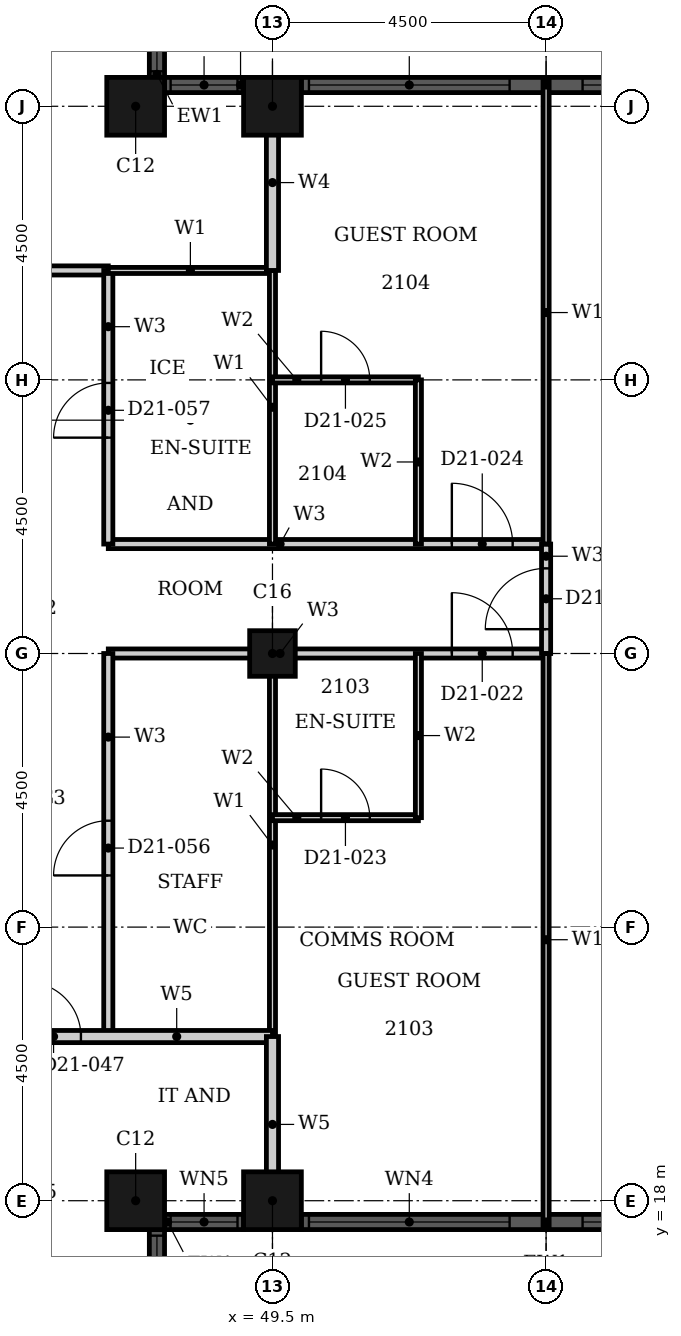
"""IFC4 building model, lengths in metres.
Left out: names, types, materials, properties, quantities, classifications, styles, units other than length and angle.
Written with IfcOpenShell. Run it as: python <this file> out.ifc"""

import sys

from ifc_helpers import new_model, si_unit, direction, frame, frame_2d, origin, origin_2d, place, context, subcontext, project, spatial, rectangle, hollow_rectangle, extrude, element, fill, save


model = new_model("IFC4")
c1 = context("Model", 3, precision=1e-05, world=origin(), true_north=direction((0.0, 1.0)))
c2 = subcontext(c1, "Body", "Model", "MODEL_VIEW")
j1 = project(units=[si_unit("LENGTHUNIT", "METRE"), si_unit("PLANEANGLEUNIT", "RADIAN")], contexts=[c1])
p1 = place(None, origin())
s1 = spatial("IfcSite", under=j1, at=p1, CompositionType="ELEMENT")
p2 = place(p1, origin())
s2 = spatial("IfcBuilding", under=s1, at=p2, CompositionType="ELEMENT")
p3 = place(p2, frame((0.0, 0.0, 88.8)))
s3 = spatial("IfcBuildingStorey", under=s2, at=p3, CompositionType="ELEMENT", Elevation=88.8)
for number, where, z_axis, x_axis in (
    (1, (47.25, 18.0, 0.0), (0.0, 0.0, 1.0), (1.0, 0.0, 0.0)),
    (2, (49.5, 18.0, 0.0), (0.0, 0.0, 1.0), (1.0, 0.0, 0.0)),
    (3, (49.5, 36.0, 0.0), (0.0, 0.0, 1.0), (1.0, 0.0, 0.0)),
    (4, (47.25, 36.0, 0.0), (0.0, 0.0, 1.0), (1.0, 0.0, 0.0)),
):
    element("IfcColumn", number, at=place(p3, frame(where, z_axis=z_axis, x_axis=x_axis)), inside=s3, PredefinedType="COLUMN", context=c2, shape_type="SweptSolid", body=[
        extrude(hollow_rectangle(XDim=0.95, YDim=0.95, WallThickness=0.03, at=origin_2d()), origin(), (0.0, 0.0, 1.0), 3.6),
    ])
p4 = place(p3, frame((49.5, 27.0, 0.0), z_axis=(0.0, 0.0, 1.0), x_axis=(1.0, 0.0, 0.0)))
e5 = element("IfcColumn", 5, at=p4, inside=s3, PredefinedType="COLUMN", context=c2, shape_type="SweptSolid", body=[
    extrude(hollow_rectangle(XDim=0.75, YDim=0.75, WallThickness=0.024, at=origin_2d()), origin(), (0.0, 0.0, 1.0), 3.6),
])
p5 = place(p3, frame((47.6, 16.225, 0.0), z_axis=(0.0, 0.0, 1.0), x_axis=(0.0, 1.0, 0.0)))
e6 = element("IfcWall", 6, at=p5, inside=s3, PredefinedType="SOLIDWALL", context=c2, shape_type="SweptSolid", body=[
    extrude(rectangle(XDim=1.3, YDim=0.25, at=frame_2d((0.65, 0.0))), origin(), (0.0, 0.0, 1.0), 3.6),
])
p6 = place(p5, frame((0.1, 0.0, 0.9)))
e7 = element("IfcOpeningElement", 7, at=p6, cuts=e6, PredefinedType="OPENING", context=c2, shape_type="SweptSolid", body=[
    extrude(rectangle(XDim=1.1, YDim=2.08, at=frame_2d((0.55, 1.04))), frame((0.0, 0.135, 0.0), z_axis=(0.0, -1.0, 0.0), x_axis=(1.0, 0.0, 0.0)), (0.0, 0.0, 1.0), 0.27),
])
p7 = place(p3, frame((47.725, 17.65, 0.0), z_axis=(0.0, 0.0, 1.0), x_axis=(1.0, 0.0, 0.0)))
e8 = element("IfcWall", 8, at=p7, inside=s3, PredefinedType="SOLIDWALL", context=c2, shape_type="SweptSolid", body=[
    extrude(rectangle(XDim=1.3, YDim=0.25, at=frame_2d((0.65, 0.0))), origin(), (0.0, 0.0, 1.0), 3.6),
])
p8 = place(p7, frame((0.1, 0.0, 0.9)))
e9 = element("IfcOpeningElement", 9, at=p8, cuts=e8, PredefinedType="OPENING", context=c2, shape_type="SweptSolid", body=[
    extrude(rectangle(XDim=1.1, YDim=2.08, at=frame_2d((0.55, 1.04))), frame((0.0, 0.135, 0.0), z_axis=(0.0, -1.0, 0.0), x_axis=(1.0, 0.0, 0.0)), (0.0, 0.0, 1.0), 0.27),
])
p9 = place(p3, frame((49.975, 17.65, 0.0), z_axis=(0.0, 0.0, 1.0), x_axis=(1.0, 0.0, 0.0)))
e10 = element("IfcWall", 10, at=p9, inside=s3, PredefinedType="SOLIDWALL", context=c2, shape_type="SweptSolid", body=[
    extrude(rectangle(XDim=8.05, YDim=0.25, at=frame_2d((4.025, 0.0))), origin(), (0.0, 0.0, 1.0), 3.6),
])
p10 = place(p9, frame((0.125, 0.0, 0.9)))
e11 = element("IfcOpeningElement", 11, at=p10, cuts=e10, PredefinedType="OPENING", context=c2, shape_type="SweptSolid", body=[
    extrude(rectangle(XDim=3.3, YDim=2.08, at=frame_2d((1.65, 1.04))), frame((0.0, 0.135, 0.0), z_axis=(0.0, -1.0, 0.0), x_axis=(1.0, 0.0, 0.0)), (0.0, 0.0, 1.0), 0.27),
])
p11 = place(p9, frame((4.625, 0.0, 0.9)))
e12 = element("IfcOpeningElement", 12, at=p11, cuts=e10, PredefinedType="OPENING", context=c2, shape_type="SweptSolid", body=[
    extrude(rectangle(XDim=3.3, YDim=2.08, at=frame_2d((1.65, 1.04))), frame((0.0, 0.135, 0.0), z_axis=(0.0, -1.0, 0.0), x_axis=(1.0, 0.0, 0.0)), (0.0, 0.0, 1.0), 0.27),
])
p12 = place(p3, frame((58.025, 36.35, 0.0), z_axis=(0.0, 0.0, 1.0), x_axis=(-1.0, 0.0, 0.0)))
e13 = element("IfcWall", 13, at=p12, inside=s3, PredefinedType="SOLIDWALL", context=c2, shape_type="SweptSolid", body=[
    extrude(rectangle(XDim=8.05, YDim=0.25, at=frame_2d((4.025, 0.0))), origin(), (0.0, 0.0, 1.0), 3.6),
])
p13 = place(p12, frame((0.125, 0.0, 0.9)))
e14 = element("IfcOpeningElement", 14, at=p13, cuts=e13, PredefinedType="OPENING", context=c2, shape_type="SweptSolid", body=[
    extrude(rectangle(XDim=3.3, YDim=2.08, at=frame_2d((1.65, 1.04))), frame((0.0, 0.135, 0.0), z_axis=(0.0, -1.0, 0.0), x_axis=(1.0, 0.0, 0.0)), (0.0, 0.0, 1.0), 0.27),
])
p14 = place(p12, frame((4.625, 0.0, 0.9)))
e15 = element("IfcOpeningElement", 15, at=p14, cuts=e13, PredefinedType="OPENING", context=c2, shape_type="SweptSolid", body=[
    extrude(rectangle(XDim=3.3, YDim=2.08, at=frame_2d((1.65, 1.04))), frame((0.0, 0.135, 0.0), z_axis=(0.0, -1.0, 0.0), x_axis=(1.0, 0.0, 0.0)), (0.0, 0.0, 1.0), 0.27),
])
p15 = place(p3, frame((49.025, 36.35, 0.0), z_axis=(0.0, 0.0, 1.0), x_axis=(-1.0, 0.0, 0.0)))
e16 = element("IfcWall", 16, at=p15, inside=s3, PredefinedType="SOLIDWALL", context=c2, shape_type="SweptSolid", body=[
    extrude(rectangle(XDim=1.3, YDim=0.25, at=frame_2d((0.65, 0.0))), origin(), (0.0, 0.0, 1.0), 3.6),
])
p16 = place(p15, frame((0.1, 0.0, 0.9)))
e17 = element("IfcOpeningElement", 17, at=p16, cuts=e16, PredefinedType="OPENING", context=c2, shape_type="SweptSolid", body=[
    extrude(rectangle(XDim=1.1, YDim=2.08, at=frame_2d((0.55, 1.04))), frame((0.0, 0.135, 0.0), z_axis=(0.0, -1.0, 0.0), x_axis=(1.0, 0.0, 0.0)), (0.0, 0.0, 1.0), 0.27),
])
p17 = place(p3, frame((47.6, 36.475, 0.0), z_axis=(0.0, 0.0, 1.0), x_axis=(0.0, 1.0, 0.0)))
e18 = element("IfcWall", 18, at=p17, inside=s3, PredefinedType="SOLIDWALL", context=c2, shape_type="SweptSolid", body=[
    extrude(rectangle(XDim=1.3, YDim=0.25, at=frame_2d((0.65, 0.0))), origin(), (0.0, 0.0, 1.0), 3.6),
])
p18 = place(p17, frame((0.1, 0.0, 0.9)))
e19 = element("IfcOpeningElement", 19, at=p18, cuts=e18, PredefinedType="OPENING", context=c2, shape_type="SweptSolid", body=[
    extrude(rectangle(XDim=1.1, YDim=2.08, at=frame_2d((0.55, 1.04))), frame((0.0, 0.135, 0.0), z_axis=(0.0, -1.0, 0.0), x_axis=(1.0, 0.0, 0.0)), (0.0, 0.0, 1.0), 0.27),
])
p19 = place(p3, frame((46.8, 27.0, 0.0), z_axis=(0.0, 0.0, 1.0), x_axis=(1.0, 0.0, 0.0)))
e20 = element("IfcWall", 20, at=p19, inside=s3, PredefinedType="PARTITIONING", context=c2, shape_type="SweptSolid", body=[
    extrude(rectangle(XDim=7.2, YDim=0.15, at=frame_2d((3.6, 0.0))), origin(), (0.0, 0.0, 1.0), 2.58),
])
p20 = place(p19, frame((5.65, 0.0, 0.0)))
e21 = element("IfcOpeningElement", 21, at=p20, cuts=e20, PredefinedType="OPENING", context=c2, shape_type="SweptSolid", body=[
    extrude(rectangle(XDim=1.0, YDim=2.1, at=frame_2d((0.5, 1.05))), frame((0.0, 0.085, 0.0), z_axis=(0.0, -1.0, 0.0), x_axis=(1.0, 0.0, 0.0)), (0.0, 0.0, 1.0), 0.17),
])
p21 = place(p3, frame((46.8, 28.8, 0.0), z_axis=(0.0, 0.0, 1.0), x_axis=(1.0, 0.0, 0.0)))
e22 = element("IfcWall", 22, at=p21, inside=s3, PredefinedType="PARTITIONING", context=c2, shape_type="SweptSolid", body=[
    extrude(rectangle(XDim=7.2, YDim=0.15, at=frame_2d((3.6, 0.0))), origin(), (0.0, 0.0, 1.0), 3.3),
])
p22 = place(p21, frame((5.65, 0.0, 0.0)))
e23 = element("IfcOpeningElement", 23, at=p22, cuts=e22, PredefinedType="OPENING", context=c2, shape_type="SweptSolid", body=[
    extrude(rectangle(XDim=1.0, YDim=2.1, at=frame_2d((0.5, 1.05))), frame((0.0, 0.085, 0.0), z_axis=(0.0, -1.0, 0.0), x_axis=(1.0, 0.0, 0.0)), (0.0, 0.0, 1.0), 0.17),
])
p23 = place(p3, frame((33.3, 33.3, 0.0), z_axis=(0.0, 0.0, 1.0), x_axis=(1.0, 0.0, 0.0)))
e24 = element("IfcWall", 24, at=p23, inside=s3, PredefinedType="PARTITIONING", context=c2, shape_type="SweptSolid", body=[
    extrude(rectangle(XDim=13.5, YDim=0.15, at=frame_2d((6.75, 0.0))), origin(), (0.0, 0.0, 1.0), 3.3),
])
p24 = place(p23, frame((10.15, 0.0, 0.0)))
e25 = element("IfcOpeningElement", 25, at=p24, cuts=e24, PredefinedType="OPENING", context=c2, shape_type="SweptSolid", body=[
    extrude(rectangle(XDim=1.0, YDim=2.1, at=frame_2d((0.5, 1.05))), frame((0.0, 0.085, 0.0), z_axis=(0.0, -1.0, 0.0), x_axis=(1.0, 0.0, 0.0)), (0.0, 0.0, 1.0), 0.17),
])
p25 = place(p23, frame((3.15, 0.0, 0.0)))
e26 = element("IfcOpeningElement", 26, at=p25, cuts=e24, PredefinedType="OPENING", context=c2, shape_type="SweptSolid", body=[
    extrude(rectangle(XDim=0.9, YDim=2.1, at=frame_2d((0.45, 1.05))), frame((0.0, 0.085, 0.0), z_axis=(0.0, -1.0, 0.0), x_axis=(1.0, 0.0, 0.0)), (0.0, 0.0, 1.0), 0.17),
])
p26 = place(p3, frame((46.8, 28.8, 0.0), z_axis=(0.0, 0.0, 1.0), x_axis=(0.0, 1.0, 0.0)))
e27 = element("IfcWall", 27, at=p26, inside=s3, PredefinedType="PARTITIONING", context=c2, shape_type="SweptSolid", body=[
    extrude(rectangle(XDim=4.5, YDim=0.15, at=frame_2d((2.25, 0.0))), origin(), (0.0, 0.0, 1.0), 3.3),
])
p27 = place(p26, frame((1.75, 0.0, 0.0)))
e28 = element("IfcOpeningElement", 28, at=p27, cuts=e27, PredefinedType="OPENING", context=c2, shape_type="SweptSolid", body=[
    extrude(rectangle(XDim=0.9, YDim=2.1, at=frame_2d((0.45, 1.05))), frame((0.0, 0.085, 0.0), z_axis=(0.0, -1.0, 0.0), x_axis=(1.0, 0.0, 0.0)), (0.0, 0.0, 1.0), 0.17),
])
p28 = place(p3, frame((46.8, 20.7, 0.0), z_axis=(0.0, 0.0, 1.0), x_axis=(0.0, 1.0, 0.0)))
e29 = element("IfcWall", 29, at=p28, inside=s3, PredefinedType="PARTITIONING", context=c2, shape_type="SweptSolid", body=[
    extrude(rectangle(XDim=6.3, YDim=0.15, at=frame_2d((3.15, 0.0))), origin(), (0.0, 0.0, 1.0), 3.3),
])
p29 = place(p28, frame((2.65, 0.0, 0.0)))
e30 = element("IfcOpeningElement", 30, at=p29, cuts=e29, PredefinedType="OPENING", context=c2, shape_type="SweptSolid", body=[
    extrude(rectangle(XDim=0.9, YDim=2.1, at=frame_2d((0.45, 1.05))), frame((0.0, 0.085, 0.0), z_axis=(0.0, -1.0, 0.0), x_axis=(1.0, 0.0, 0.0)), (0.0, 0.0, 1.0), 0.17),
])
p30 = place(p3, frame((54.0, 27.0, 0.0), z_axis=(0.0, 0.0, 1.0), x_axis=(0.0, 1.0, 0.0)))
e31 = element("IfcWall", 31, at=p30, inside=s3, PredefinedType="PARTITIONING", context=c2, shape_type="SweptSolid", body=[
    extrude(rectangle(XDim=1.8, YDim=0.15, at=frame_2d((0.9, 0.0))), origin(), (0.0, 0.0, 1.0), 3.3),
])
p31 = place(p30, frame((0.4, 0.0, 0.0)))
e32 = element("IfcOpeningElement", 32, at=p31, cuts=e31, PredefinedType="OPENING", context=c2, shape_type="SweptSolid", body=[
    extrude(rectangle(XDim=1.0, YDim=2.1, at=frame_2d((0.5, 1.05))), frame((0.0, 0.085, 0.0), z_axis=(0.0, -1.0, 0.0), x_axis=(1.0, 0.0, 0.0)), (0.0, 0.0, 1.0), 0.17),
])
p32 = place(p3, frame((46.8, 33.3, 0.0), z_axis=(0.0, 0.0, 1.0), x_axis=(1.0, 0.0, 0.0)))
e33 = element("IfcWall", 33, at=p32, inside=s3, PredefinedType="PARTITIONING", context=c2, shape_type="SweptSolid", body=[
    extrude(rectangle(XDim=2.7, YDim=0.1, at=frame_2d((1.35, 0.0))), origin(), (0.0, 0.0, 1.0), 3.3),
])
p33 = place(p3, frame((49.5, 28.8, 0.0), z_axis=(0.0, 0.0, 1.0), x_axis=(0.0, 1.0, 0.0)))
e34 = element("IfcWall", 34, at=p33, inside=s3, PredefinedType="PARTITIONING", context=c2, shape_type="SweptSolid", body=[
    extrude(rectangle(XDim=4.5, YDim=0.1, at=frame_2d((2.25, 0.0))), origin(), (0.0, 0.0, 1.0), 2.38),
])
p34 = place(p3, frame((49.5, 20.7, 0.0), z_axis=(0.0, 0.0, 1.0), x_axis=(0.0, 1.0, 0.0)))
e35 = element("IfcWall", 35, at=p34, inside=s3, PredefinedType="PARTITIONING", context=c2, shape_type="SweptSolid", body=[
    extrude(rectangle(XDim=6.3, YDim=0.1, at=frame_2d((3.15, 0.0))), origin(), (0.0, 0.0, 1.0), 2.38),
])
p35 = place(p3, frame((54.0, 28.8, 0.0), z_axis=(0.0, 0.0, 1.0), x_axis=(0.0, 1.0, 0.0)))
e36 = element("IfcWall", 36, at=p35, inside=s3, PredefinedType="PARTITIONING", context=c2, shape_type="SweptSolid", body=[
    extrude(rectangle(XDim=7.615, YDim=0.1, at=frame_2d((3.808, 0.0))), origin(), (0.0, 0.0, 1.0), 3.3),
])
p36 = place(p3, frame((54.0, 17.585, 0.0), z_axis=(0.0, 0.0, 1.0), x_axis=(0.0, 1.0, 0.0)))
e37 = element("IfcWall", 37, at=p36, inside=s3, PredefinedType="PARTITIONING", context=c2, shape_type="SweptSolid", body=[
    extrude(rectangle(XDim=9.415, YDim=0.1, at=frame_2d((4.708, 0.0))), origin(), (0.0, 0.0, 1.0), 3.3),
])
p37 = place(p3, frame((49.5, 33.3, 0.0), z_axis=(0.0, 0.0, 1.0), x_axis=(0.0, 1.0, 0.0)))
e38 = element("IfcWall", 38, at=p37, inside=s3, PredefinedType="PARTITIONING", context=c2, shape_type="SweptSolid", body=[
    extrude(rectangle(XDim=2.89, YDim=0.2, at=frame_2d((1.445, 0.0))), origin(), (0.0, 0.0, 1.0), 2.38),
])
p38 = place(p3, frame((49.5, 24.3, 0.0), z_axis=(0.0, 0.0, 1.0), x_axis=(1.0, 0.0, 0.0)))
e39 = element("IfcWall", 39, at=p38, inside=s3, PredefinedType="PARTITIONING", context=c2, shape_type="SweptSolid", body=[
    extrude(rectangle(XDim=2.4, YDim=0.1, at=frame_2d((1.2, 0.0))), origin(), (0.0, 0.0, 1.0), 3.3),
])
p39 = place(p38, frame((0.8, 0.0, 0.0)))
e40 = element("IfcOpeningElement", 40, at=p39, cuts=e39, PredefinedType="OPENING", context=c2, shape_type="SweptSolid", body=[
    extrude(rectangle(XDim=0.8, YDim=2.1, at=frame_2d((0.4, 1.05))), frame((0.0, 0.06, 0.0), z_axis=(0.0, -1.0, 0.0), x_axis=(1.0, 0.0, 0.0)), (0.0, 0.0, 1.0), 0.12),
])
p40 = place(p3, frame((49.5, 31.5, 0.0), z_axis=(0.0, 0.0, 1.0), x_axis=(1.0, 0.0, 0.0)))
e41 = element("IfcWall", 41, at=p40, inside=s3, PredefinedType="PARTITIONING", context=c2, shape_type="SweptSolid", body=[
    extrude(rectangle(XDim=2.4, YDim=0.1, at=frame_2d((1.2, 0.0))), origin(), (0.0, 0.0, 1.0), 2.58),
])
p41 = place(p40, frame((0.8, 0.0, 0.0)))
e42 = element("IfcOpeningElement", 42, at=p41, cuts=e41, PredefinedType="OPENING", context=c2, shape_type="SweptSolid", body=[
    extrude(rectangle(XDim=0.8, YDim=2.1, at=frame_2d((0.4, 1.05))), frame((0.0, 0.06, 0.0), z_axis=(0.0, -1.0, 0.0), x_axis=(1.0, 0.0, 0.0)), (0.0, 0.0, 1.0), 0.12),
])
for number, where, z_axis, x_axis in (
    (43, (51.9, 28.8, 0.0), (0.0, 0.0, 1.0), (0.0, 1.0, 0.0)),
    (44, (51.9, 24.3, 0.0), (0.0, 0.0, 1.0), (0.0, 1.0, 0.0)),
):
    element("IfcWall", number, at=place(p3, frame(where, z_axis=z_axis, x_axis=x_axis)), inside=s3, PredefinedType="PARTITIONING", context=c2, shape_type="SweptSolid", body=[
        extrude(rectangle(XDim=2.7, YDim=0.1, at=frame_2d((1.35, 0.0))), origin(), (0.0, 0.0, 1.0), 3.3),
    ])
p42 = place(p3, frame((45.0, 20.7, 0.0), z_axis=(0.0, 0.0, 1.0), x_axis=(1.0, 0.0, 0.0)))
e45 = element("IfcWall", 45, at=p42, inside=s3, PredefinedType="PARTITIONING", context=c2, shape_type="SweptSolid", body=[
    extrude(rectangle(XDim=4.5, YDim=0.2, at=frame_2d((2.25, 0.0))), origin(), (0.0, 0.0, 1.0), 3.3),
])
p43 = place(p42, frame((0.45, 0.0, 0.0)))
e46 = element("IfcOpeningElement", 46, at=p43, cuts=e45, PredefinedType="OPENING", context=c2, shape_type="SweptSolid", body=[
    extrude(rectangle(XDim=0.9, YDim=2.1, at=frame_2d((0.45, 1.05))), frame((0.0, 0.11, 0.0), z_axis=(0.0, -1.0, 0.0), x_axis=(1.0, 0.0, 0.0)), (0.0, 0.0, 1.0), 0.22),
])
p44 = place(p3, frame((49.5, 17.81, 0.0), z_axis=(0.0, 0.0, 1.0), x_axis=(0.0, 1.0, 0.0)))
e47 = element("IfcWall", 47, at=p44, inside=s3, PredefinedType="PARTITIONING", context=c2, shape_type="SweptSolid", body=[
    extrude(rectangle(XDim=2.89, YDim=0.2, at=frame_2d((1.445, 0.0))), origin(), (0.0, 0.0, 1.0), 2.38),
])
p45 = place(p6, origin())
e48 = element("IfcWindow", 48, at=p45, inside=s3, PartitioningType="SINGLE_PANEL", PredefinedType="WINDOW", context=c2, shape_type="SweptSolid", body=[
    extrude(rectangle(XDim=1.1, YDim=2.08, at=frame_2d((0.55, 1.04))), frame((0.0, 0.03, 0.0), z_axis=(0.0, -1.0, 0.0), x_axis=(1.0, 0.0, 0.0)), (0.0, 0.0, 1.0), 0.06),
])
fill(e7, e48)
p46 = place(p8, origin())
e49 = element("IfcWindow", 49, at=p46, inside=s3, PartitioningType="SINGLE_PANEL", PredefinedType="WINDOW", context=c2, shape_type="SweptSolid", body=[
    extrude(rectangle(XDim=1.1, YDim=2.08, at=frame_2d((0.55, 1.04))), frame((0.0, 0.03, 0.0), z_axis=(0.0, -1.0, 0.0), x_axis=(1.0, 0.0, 0.0)), (0.0, 0.0, 1.0), 0.06),
])
fill(e9, e49)
p47 = place(p10, origin())
e50 = element("IfcWindow", 50, at=p47, inside=s3, PartitioningType="SINGLE_PANEL", PredefinedType="WINDOW", context=c2, shape_type="SweptSolid", body=[
    extrude(rectangle(XDim=3.3, YDim=2.08, at=frame_2d((1.65, 1.04))), frame((0.0, 0.03, 0.0), z_axis=(0.0, -1.0, 0.0), x_axis=(1.0, 0.0, 0.0)), (0.0, 0.0, 1.0), 0.06),
])
fill(e11, e50)
p48 = place(p11, origin())
e51 = element("IfcWindow", 51, at=p48, inside=s3, PartitioningType="SINGLE_PANEL", PredefinedType="WINDOW", context=c2, shape_type="SweptSolid", body=[
    extrude(rectangle(XDim=3.3, YDim=2.08, at=frame_2d((1.65, 1.04))), frame((0.0, 0.03, 0.0), z_axis=(0.0, -1.0, 0.0), x_axis=(1.0, 0.0, 0.0)), (0.0, 0.0, 1.0), 0.06),
])
fill(e12, e51)
p49 = place(p13, origin())
e52 = element("IfcWindow", 52, at=p49, inside=s3, PartitioningType="SINGLE_PANEL", PredefinedType="WINDOW", context=c2, shape_type="SweptSolid", body=[
    extrude(rectangle(XDim=3.3, YDim=2.08, at=frame_2d((1.65, 1.04))), frame((0.0, 0.03, 0.0), z_axis=(0.0, -1.0, 0.0), x_axis=(1.0, 0.0, 0.0)), (0.0, 0.0, 1.0), 0.06),
])
fill(e14, e52)
p50 = place(p14, origin())
e53 = element("IfcWindow", 53, at=p50, inside=s3, PartitioningType="SINGLE_PANEL", PredefinedType="WINDOW", context=c2, shape_type="SweptSolid", body=[
    extrude(rectangle(XDim=3.3, YDim=2.08, at=frame_2d((1.65, 1.04))), frame((0.0, 0.03, 0.0), z_axis=(0.0, -1.0, 0.0), x_axis=(1.0, 0.0, 0.0)), (0.0, 0.0, 1.0), 0.06),
])
fill(e15, e53)
p51 = place(p16, origin())
e54 = element("IfcWindow", 54, at=p51, inside=s3, PartitioningType="SINGLE_PANEL", PredefinedType="WINDOW", context=c2, shape_type="SweptSolid", body=[
    extrude(rectangle(XDim=1.1, YDim=2.08, at=frame_2d((0.55, 1.04))), frame((0.0, 0.03, 0.0), z_axis=(0.0, -1.0, 0.0), x_axis=(1.0, 0.0, 0.0)), (0.0, 0.0, 1.0), 0.06),
])
fill(e17, e54)
p52 = place(p18, origin())
e55 = element("IfcWindow", 55, at=p52, inside=s3, PartitioningType="SINGLE_PANEL", PredefinedType="WINDOW", context=c2, shape_type="SweptSolid", body=[
    extrude(rectangle(XDim=1.1, YDim=2.08, at=frame_2d((0.55, 1.04))), frame((0.0, 0.03, 0.0), z_axis=(0.0, -1.0, 0.0), x_axis=(1.0, 0.0, 0.0)), (0.0, 0.0, 1.0), 0.06),
])
fill(e19, e55)
p53 = place(p20, origin())
e56 = element("IfcDoor", 56, at=p53, inside=s3, OperationType="SINGLE_SWING_RIGHT", PredefinedType="DOOR", context=c2, shape_type="SweptSolid", body=[
    extrude(rectangle(XDim=1.0, YDim=2.1, at=frame_2d((0.5, 1.05))), frame((0.0, 0.025, 0.0), z_axis=(0.0, -1.0, 0.0), x_axis=(1.0, 0.0, 0.0)), (0.0, 0.0, 1.0), 0.05),
])
fill(e21, e56)
p54 = place(p39, origin())
e57 = element("IfcDoor", 57, at=p54, inside=s3, OperationType="SINGLE_SWING_LEFT", PredefinedType="DOOR", context=c2, shape_type="SweptSolid", body=[
    extrude(rectangle(XDim=0.8, YDim=2.1, at=frame_2d((0.4, 1.05))), frame((0.0, 0.025, 0.0), z_axis=(0.0, -1.0, 0.0), x_axis=(1.0, 0.0, 0.0)), (0.0, 0.0, 1.0), 0.05),
])
fill(e40, e57)
p55 = place(p22, origin())
e58 = element("IfcDoor", 58, at=p55, inside=s3, OperationType="SINGLE_SWING_RIGHT", PredefinedType="DOOR", context=c2, shape_type="SweptSolid", body=[
    extrude(rectangle(XDim=1.0, YDim=2.1, at=frame_2d((0.5, 1.05))), frame((0.0, 0.025, 0.0), z_axis=(0.0, -1.0, 0.0), x_axis=(1.0, 0.0, 0.0)), (0.0, 0.0, 1.0), 0.05),
])
fill(e23, e58)
p56 = place(p41, origin())
e59 = element("IfcDoor", 59, at=p56, inside=s3, OperationType="SINGLE_SWING_RIGHT", PredefinedType="DOOR", context=c2, shape_type="SweptSolid", body=[
    extrude(rectangle(XDim=0.8, YDim=2.1, at=frame_2d((0.4, 1.05))), frame((0.0, 0.025, 0.0), z_axis=(0.0, -1.0, 0.0), x_axis=(1.0, 0.0, 0.0)), (0.0, 0.0, 1.0), 0.05),
])
fill(e42, e59)
p57 = place(p31, origin())
e60 = element("IfcDoor", 60, at=p57, inside=s3, OperationType="SINGLE_SWING_RIGHT", PredefinedType="DOOR", context=c2, shape_type="SweptSolid", body=[
    extrude(rectangle(XDim=1.0, YDim=2.1, at=frame_2d((0.5, 1.05))), frame((0.0, 0.025, 0.0), z_axis=(0.0, -1.0, 0.0), x_axis=(1.0, 0.0, 0.0)), (0.0, 0.0, 1.0), 0.05),
])
fill(e32, e60)
p58 = place(p43, origin())
e61 = element("IfcDoor", 61, at=p58, inside=s3, OperationType="SINGLE_SWING_RIGHT", PredefinedType="DOOR", context=c2, shape_type="SweptSolid", body=[
    extrude(rectangle(XDim=0.9, YDim=2.1, at=frame_2d((0.45, 1.05))), frame((0.0, 0.025, 0.0), z_axis=(0.0, -1.0, 0.0), x_axis=(1.0, 0.0, 0.0)), (0.0, 0.0, 1.0), 0.05),
])
fill(e46, e61)
p59 = place(p29, origin())
e62 = element("IfcDoor", 62, at=p59, inside=s3, OperationType="SINGLE_SWING_LEFT", PredefinedType="DOOR", context=c2, shape_type="SweptSolid", body=[
    extrude(rectangle(XDim=0.9, YDim=2.1, at=frame_2d((0.45, 1.05))), frame((0.0, 0.025, 0.0), z_axis=(0.0, -1.0, 0.0), x_axis=(1.0, 0.0, 0.0)), (0.0, 0.0, 1.0), 0.05),
])
fill(e30, e62)
p60 = place(p27, origin())
e63 = element("IfcDoor", 63, at=p60, inside=s3, OperationType="SINGLE_SWING_RIGHT", PredefinedType="DOOR", context=c2, shape_type="SweptSolid", body=[
    extrude(rectangle(XDim=0.9, YDim=2.1, at=frame_2d((0.45, 1.05))), frame((0.0, 0.025, 0.0), z_axis=(0.0, -1.0, 0.0), x_axis=(1.0, 0.0, 0.0)), (0.0, 0.0, 1.0), 0.05),
])
fill(e28, e63)
save(model, sys.argv[1])
